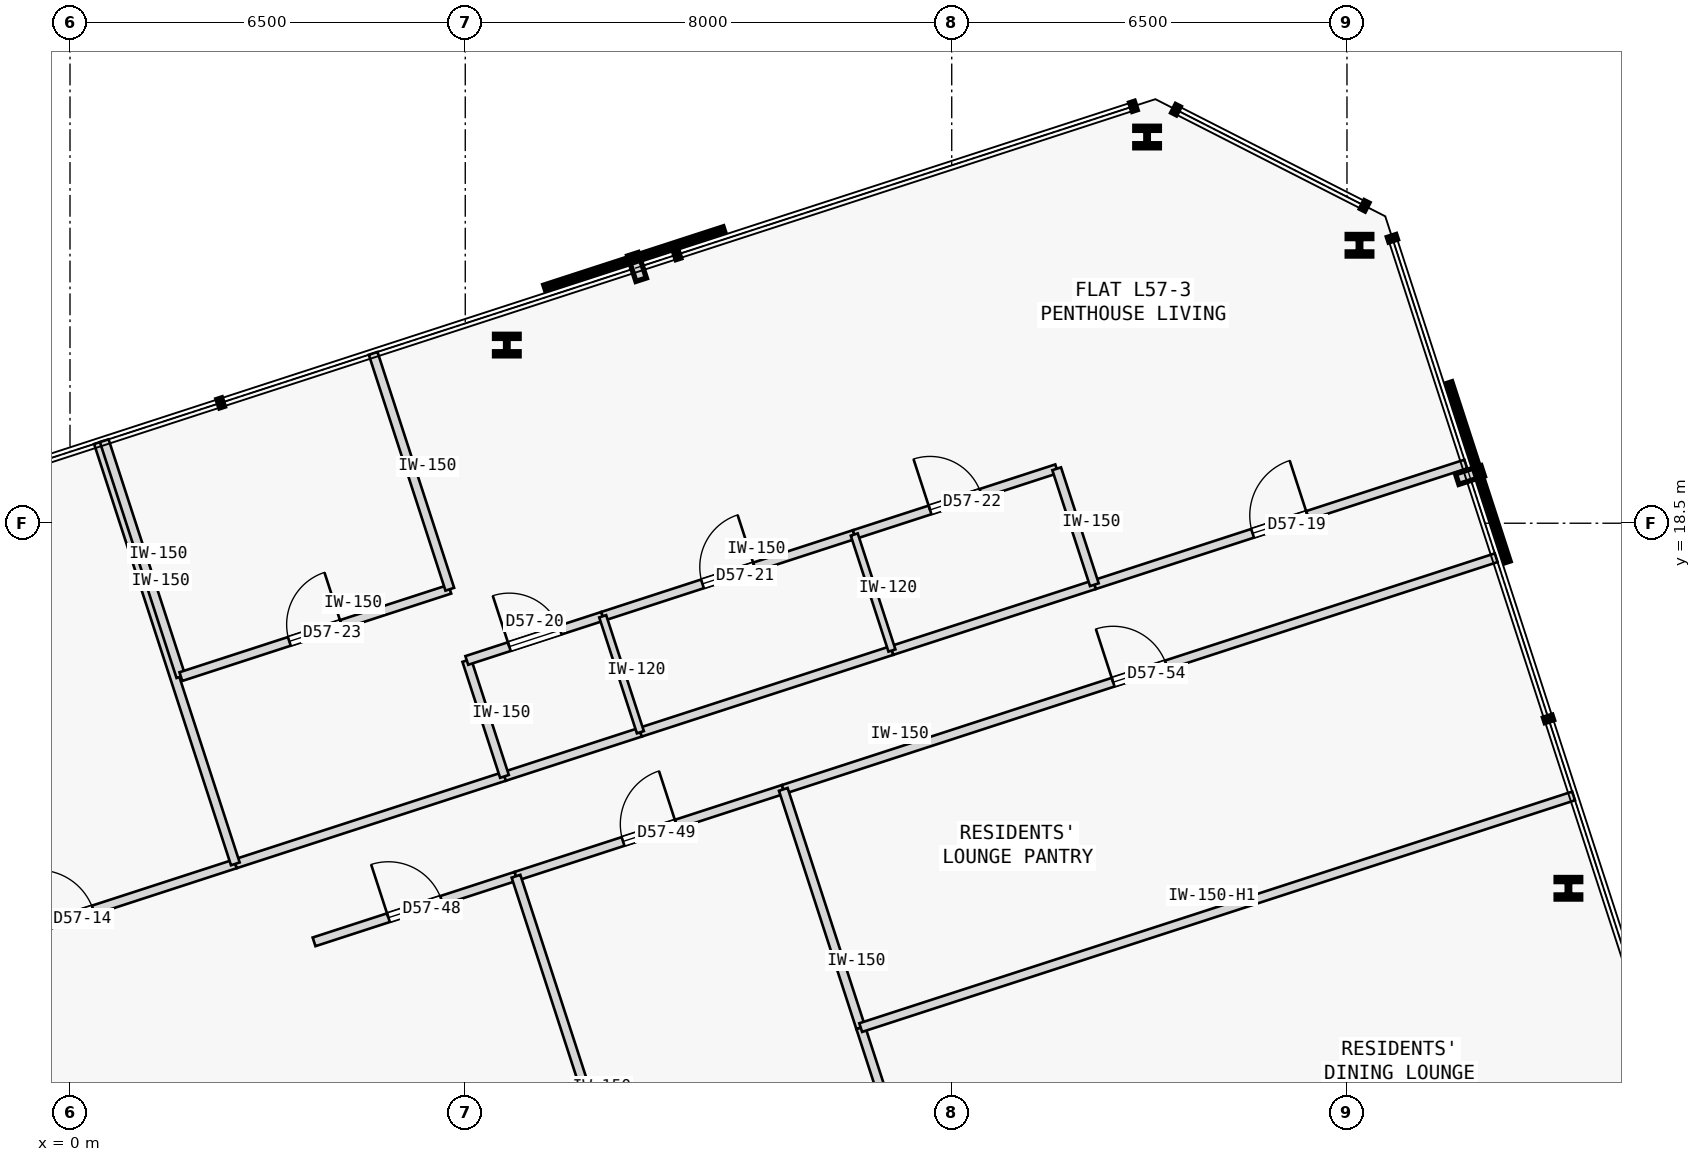
"""IFC4 building model, lengths in metres.
Left out: names, types, materials, properties, quantities, classifications, styles, units other than length and angle.
Written with IfcOpenShell. Run it as: python <this file> out.ifc"""

import sys

from ifc_helpers import new_model, si_unit, direction, frame, frame_2d, origin, origin_2d, place, context, subcontext, project, spatial, rectangle, i_section, extrude, element, fill, save


model = new_model("IFC4")
c1 = context("Model", 3, precision=1e-05, world=origin(), true_north=direction((0.0, 1.0)))
c2 = subcontext(c1, "Body", "Model", "MODEL_VIEW")
j1 = project(units=[si_unit("LENGTHUNIT", "METRE"), si_unit("PLANEANGLEUNIT", "RADIAN")], contexts=[c1])
p1 = place(None, origin())
s1 = spatial("IfcSite", under=j1, at=p1, CompositionType="ELEMENT")
p2 = place(p1, origin())
s2 = spatial("IfcBuilding", under=s1, at=p2, CompositionType="ELEMENT")
p3 = place(p2, frame((0.0, 0.0, 217.6)))
s3 = spatial("IfcBuildingStorey", under=s2, at=p3, CompositionType="ELEMENT", Elevation=217.6)
for number, where, z_axis, x_axis in (
    (1, (24.642, 12.497, 0.0), (0.0, 0.0, 1.0), (1.0, 0.0, 0.0)),
    (2, (21.206, 23.071, 0.0), (0.0, 0.0, 1.0), (1.0, 0.0, 0.0)),
    (3, (17.713, 24.851, 0.0), (0.0, 0.0, 1.0), (1.0, 0.0, 0.0)),
    (4, (7.184, 21.43, 0.0), (0.0, 0.0, 1.0), (1.0, 0.0, 0.0)),
):
    element("IfcColumn", number, at=place(p3, frame(where, z_axis=z_axis, x_axis=x_axis)), inside=s3, PredefinedType="COLUMN", context=c2, shape_type="SweptSolid", body=[
        extrude(i_section(OverallWidth=0.405, OverallDepth=0.355, WebThickness=0.042, FlangeThickness=0.068, FilletRadius=0.015, at=origin_2d()), origin(), (0.0, 0.0, 1.0), 3.35),
    ])
p4 = place(p3, frame((-2.856, 11.087, 0.0), z_axis=(0.0, 0.0, 1.0), x_axis=(0.95106314138, 0.308996603718, 0.0)))
e5 = element("IfcWall", 5, at=p4, inside=s3, PredefinedType="PARTITIONING", context=c2, shape_type="SweptSolid", body=[
    extrude(rectangle(XDim=5.862, YDim=0.15, at=frame_2d((2.931, 0.0))), origin(), (0.0, 0.0, 1.0), 3.125),
])
p5 = place(p4, frame((2.456, 0.0, 0.0)))
e6 = element("IfcOpeningElement", 6, at=p5, cuts=e5, PredefinedType="OPENING", context=c2, shape_type="SweptSolid", body=[
    extrude(rectangle(XDim=0.95, YDim=2.15, at=frame_2d((0.475, 1.075))), frame((0.0, 0.085, 0.0), z_axis=(0.0, -1.0, 0.0), x_axis=(1.0, 0.0, 0.0)), (0.0, 0.0, 1.0), 0.17),
])
p6 = place(p3, frame((2.719, 12.898, 0.0), z_axis=(0.0, 0.0, 1.0), x_axis=(0.951053341802, 0.309026764289, 0.0)))
e7 = element("IfcWall", 7, at=p6, inside=s3, PredefinedType="PARTITIONING", context=c2, shape_type="SweptSolid", body=[
    extrude(rectangle(XDim=4.654, YDim=0.15, at=frame_2d((2.327, 0.0))), origin(), (0.0, 0.0, 1.0), 3.125),
])
p7 = place(p3, frame((16.846, 17.489, 0.0), z_axis=(0.0, 0.0, 1.0), x_axis=(0.951062281754, 0.308999249554, 0.0)))
e8 = element("IfcWall", 8, at=p7, inside=s3, PredefinedType="PARTITIONING", context=c2, shape_type="SweptSolid", body=[
    extrude(rectangle(XDim=6.422, YDim=0.15, at=frame_2d((3.211, 0.0))), origin(), (0.0, 0.0, 1.0), 3.125),
])
p8 = place(p7, frame((2.736, 0.0, 0.0)))
e9 = element("IfcOpeningElement", 9, at=p8, cuts=e8, PredefinedType="OPENING", context=c2, shape_type="SweptSolid", body=[
    extrude(rectangle(XDim=0.95, YDim=2.15, at=frame_2d((0.475, 1.075))), frame((0.0, 0.085, 0.0), z_axis=(0.0, -1.0, 0.0), x_axis=(1.0, 0.0, 0.0)), (0.0, 0.0, 1.0), 0.17),
])
p9 = place(p3, frame((7.145, 14.337, 0.0), z_axis=(0.0, 0.0, 1.0), x_axis=(0.951045519245, 0.309050837767, 0.0)))
e10 = element("IfcWall", 10, at=p9, inside=s3, PredefinedType="PARTITIONING", context=c2, shape_type="SweptSolid", body=[
    extrude(rectangle(XDim=2.35, YDim=0.15, at=frame_2d((1.175, 0.0))), origin(), (0.0, 0.0, 1.0), 3.125),
])
p10 = place(p3, frame((9.38, 15.063, 0.0), z_axis=(0.0, 0.0, 1.0), x_axis=(0.951069122051, 0.308978195154, 0.0)))
e11 = element("IfcWall", 11, at=p10, inside=s3, PredefinedType="PARTITIONING", context=c2, shape_type="SweptSolid", body=[
    extrude(rectangle(XDim=4.35, YDim=0.15, at=frame_2d((2.175, 0.0))), origin(), (0.0, 0.0, 1.0), 3.125),
])
p11 = place(p3, frame((13.517, 16.407, 0.0), z_axis=(0.0, 0.0, 1.0), x_axis=(0.951041757107, 0.309062414796, 0.0)))
e12 = element("IfcWall", 12, at=p11, inside=s3, PredefinedType="PARTITIONING", context=c2, shape_type="SweptSolid", body=[
    extrude(rectangle(XDim=3.5, YDim=0.15, at=frame_2d((1.75, 0.0))), origin(), (0.0, 0.0, 1.0), 3.125),
])
p12 = place(p3, frame((4.013, 11.616, 0.0), z_axis=(0.0, 0.0, 1.0), x_axis=(0.951054104561, 0.309024416831, 0.0)))
e13 = element("IfcWall", 13, at=p12, inside=s3, PredefinedType="PARTITIONING", context=c2, shape_type="SweptSolid", body=[
    extrude(rectangle(XDim=3.492, YDim=0.15, at=frame_2d((1.746, 0.0))), origin(), (0.0, 0.0, 1.0), 3.125),
])
p13 = place(p12, frame((1.286, 0.0, 0.0)))
e14 = element("IfcOpeningElement", 14, at=p13, cuts=e13, PredefinedType="OPENING", context=c2, shape_type="SweptSolid", body=[
    extrude(rectangle(XDim=0.92, YDim=2.15, at=frame_2d((0.46, 1.075))), frame((0.0, 0.085, 0.0), z_axis=(0.0, -1.0, 0.0), x_axis=(1.0, 0.0, 0.0)), (0.0, 0.0, 1.0), 0.17),
])
p14 = place(p3, frame((7.334, 12.695, 0.0), z_axis=(0.0, 0.0, 1.0), x_axis=(0.951043772533, 0.30905621289, 0.0)))
e15 = element("IfcWall", 15, at=p14, inside=s3, PredefinedType="PARTITIONING", context=c2, shape_type="SweptSolid", body=[
    extrude(rectangle(XDim=4.622, YDim=0.15, at=frame_2d((2.311, 0.0))), origin(), (0.0, 0.0, 1.0), 3.125),
])
p15 = place(p14, frame((1.851, 0.0, 0.0)))
e16 = element("IfcOpeningElement", 16, at=p15, cuts=e15, PredefinedType="OPENING", context=c2, shape_type="SweptSolid", body=[
    extrude(rectangle(XDim=0.92, YDim=2.15, at=frame_2d((0.46, 1.075))), frame((0.0, 0.085, 0.0), z_axis=(0.0, -1.0, 0.0), x_axis=(1.0, 0.0, 0.0)), (0.0, 0.0, 1.0), 0.17),
])
p16 = place(p3, frame((11.73, 14.123, 0.0), z_axis=(0.0, 0.0, 1.0), x_axis=(0.951060263663, 0.309005460926, 0.0)))
e17 = element("IfcWall", 17, at=p16, inside=s3, PredefinedType="PARTITIONING", context=c2, shape_type="SweptSolid", body=[
    extrude(rectangle(XDim=12.327, YDim=0.15, at=frame_2d((6.164, 0.0))), origin(), (0.0, 0.0, 1.0), 3.125),
])
p17 = place(p16, frame((5.704, 0.0, 0.0)))
e18 = element("IfcOpeningElement", 18, at=p17, cuts=e17, PredefinedType="OPENING", context=c2, shape_type="SweptSolid", body=[
    extrude(rectangle(XDim=0.92, YDim=2.15, at=frame_2d((0.46, 1.075))), frame((0.0, 0.085, 0.0), z_axis=(0.0, -1.0, 0.0), x_axis=(1.0, 0.0, 0.0)), (0.0, 0.0, 1.0), 0.17),
])
p18 = place(p3, frame((2.719, 12.898, 0.0), z_axis=(0.0, 0.0, 1.0), x_axis=(-0.308998913866, 0.951062390819, 0.0)))
e19 = element("IfcWall", 19, at=p18, inside=s3, PredefinedType="PARTITIONING", context=c2, shape_type="SweptSolid", body=[
    extrude(rectangle(XDim=7.284, YDim=0.15, at=frame_2d((3.642, 0.0))), origin(), (0.0, 0.0, 1.0), 3.125),
])
p19 = place(p3, frame((7.145, 14.337, 0.0), z_axis=(0.0, 0.0, 1.0), x_axis=(-0.308948390121, 0.951078804433, 0.0)))
e20 = element("IfcWall", 20, at=p19, inside=s3, PredefinedType="PARTITIONING", context=c2, shape_type="SweptSolid", body=[
    extrude(rectangle(XDim=2.005, YDim=0.15, at=frame_2d((1.002, 0.0))), origin(), (0.0, 0.0, 1.0), 3.125),
])
p20 = place(p3, frame((6.525, 16.243, 0.0), z_axis=(0.0, 0.0, 1.0), x_axis=(0.951035595692, 0.309081373955, 0.0)))
e21 = element("IfcWall", 21, at=p20, inside=s3, PredefinedType="PARTITIONING", context=c2, shape_type="SweptSolid", body=[
    extrude(rectangle(XDim=2.35, YDim=0.15, at=frame_2d((1.175, 0.0))), origin(), (0.0, 0.0, 1.0), 3.125),
])
p21 = place(p20, frame((0.735, 0.0, 0.0)))
e22 = element("IfcOpeningElement", 22, at=p21, cuts=e21, PredefinedType="OPENING", context=c2, shape_type="SweptSolid", body=[
    extrude(rectangle(XDim=0.88, YDim=2.15, at=frame_2d((0.44, 1.075))), frame((0.0, 0.085, 0.0), z_axis=(0.0, -1.0, 0.0), x_axis=(1.0, 0.0, 0.0)), (0.0, 0.0, 1.0), 0.17),
])
p22 = place(p3, frame((8.76, 16.97, 0.0), z_axis=(0.0, 0.0, 1.0), x_axis=(0.951052627573, 0.309028962374, 0.0)))
e23 = element("IfcWall", 23, at=p22, inside=s3, PredefinedType="PARTITIONING", context=c2, shape_type="SweptSolid", body=[
    extrude(rectangle(XDim=4.35, YDim=0.15, at=frame_2d((2.175, 0.0))), origin(), (0.0, 0.0, 1.0), 3.125),
])
p23 = place(p22, frame((1.725, 0.0, 0.0)))
e24 = element("IfcOpeningElement", 24, at=p23, cuts=e23, PredefinedType="OPENING", context=c2, shape_type="SweptSolid", body=[
    extrude(rectangle(XDim=0.9, YDim=2.15, at=frame_2d((0.45, 1.075))), frame((0.0, 0.085, 0.0), z_axis=(0.0, -1.0, 0.0), x_axis=(1.0, 0.0, 0.0)), (0.0, 0.0, 1.0), 0.17),
])
p24 = place(p3, frame((12.897, 18.314, 0.0), z_axis=(0.0, 0.0, 1.0), x_axis=(0.951062257173, 0.308999325213, 0.0)))
e25 = element("IfcWall", 25, at=p24, inside=s3, PredefinedType="PARTITIONING", context=c2, shape_type="SweptSolid", body=[
    extrude(rectangle(XDim=3.5, YDim=0.15, at=frame_2d((1.75, 0.0))), origin(), (0.0, 0.0, 1.0), 3.125),
])
p25 = place(p24, frame((1.31, 0.0, 0.0)))
e26 = element("IfcOpeningElement", 26, at=p25, cuts=e25, PredefinedType="OPENING", context=c2, shape_type="SweptSolid", body=[
    extrude(rectangle(XDim=0.88, YDim=2.15, at=frame_2d((0.44, 1.075))), frame((0.0, 0.085, 0.0), z_axis=(0.0, -1.0, 0.0), x_axis=(1.0, 0.0, 0.0)), (0.0, 0.0, 1.0), 0.17),
])
p26 = place(p3, frame((16.846, 17.489, 0.0), z_axis=(0.0, 0.0, 1.0), x_axis=(-0.309058537449, 0.951043017129, 0.0)))
e27 = element("IfcWall", 27, at=p26, inside=s3, PredefinedType="PARTITIONING", context=c2, shape_type="SweptSolid", body=[
    extrude(rectangle(XDim=2.005, YDim=0.15, at=frame_2d((1.002, 0.0))), origin(), (0.0, 0.0, 1.0), 3.125),
])
p27 = place(p3, frame((1.823, 15.978, 0.0), z_axis=(0.0, 0.0, 1.0), x_axis=(-0.309018403393, 0.951056058476, 0.0)))
e28 = element("IfcWall", 28, at=p27, inside=s3, PredefinedType="PARTITIONING", context=c2, shape_type="SweptSolid", body=[
    extrude(rectangle(XDim=4.079, YDim=0.15, at=frame_2d((2.04, 0.0))), origin(), (0.0, 0.0, 1.0), 3.125),
])
p28 = place(p3, frame((1.823, 15.978, 0.0), z_axis=(0.0, 0.0, 1.0), x_axis=(0.951050272606, 0.309036209813, 0.0)))
e29 = element("IfcWall", 29, at=p28, inside=s3, PredefinedType="PARTITIONING", context=c2, shape_type="SweptSolid", body=[
    extrude(rectangle(XDim=4.65, YDim=0.15, at=frame_2d((2.325, 0.0))), origin(), (0.0, 0.0, 1.0), 3.125),
])
p29 = place(p28, frame((1.875, 0.0, 0.0)))
e30 = element("IfcOpeningElement", 30, at=p29, cuts=e29, PredefinedType="OPENING", context=c2, shape_type="SweptSolid", body=[
    extrude(rectangle(XDim=0.9, YDim=2.15, at=frame_2d((0.45, 1.075))), frame((0.0, 0.085, 0.0), z_axis=(0.0, -1.0, 0.0), x_axis=(1.0, 0.0, 0.0)), (0.0, 0.0, 1.0), 0.17),
])
p30 = place(p3, frame((6.246, 17.415, 0.0), z_axis=(0.0, 0.0, 1.0), x_axis=(-0.308981853652, 0.95106793349, 0.0)))
e31 = element("IfcWall", 31, at=p30, inside=s3, PredefinedType="PARTITIONING", context=c2, shape_type="SweptSolid", body=[
    extrude(rectangle(XDim=4.079, YDim=0.15, at=frame_2d((2.039, 0.0))), origin(), (0.0, 0.0, 1.0), 3.125),
])
p31 = place(p3, frame((9.38, 15.063, 0.0), z_axis=(0.0, 0.0, 1.0), x_axis=(-0.309058537449, 0.951043017129, 0.0)))
e32 = element("IfcWall", 32, at=p31, inside=s3, PredefinedType="PARTITIONING", context=c2, shape_type="SweptSolid", body=[
    extrude(rectangle(XDim=2.005, YDim=0.12, at=frame_2d((1.002, 0.0))), origin(), (0.0, 0.0, 1.0), 3.125),
])
p32 = place(p3, frame((13.517, 16.407, 0.0), z_axis=(0.0, 0.0, 1.0), x_axis=(-0.309022749039, 0.951054646472, 0.0)))
e33 = element("IfcWall", 33, at=p32, inside=s3, PredefinedType="PARTITIONING", context=c2, shape_type="SweptSolid", body=[
    extrude(rectangle(XDim=2.005, YDim=0.12, at=frame_2d((1.002, 0.0))), origin(), (0.0, 0.0, 1.0), 3.125),
])
p33 = place(p3, frame((9.64, 5.6, 0.0), z_axis=(0.0, 0.0, 1.0), x_axis=(-0.309012069377, 0.95105811651, 0.0)))
e34 = element("IfcWall", 34, at=p33, inside=s3, PredefinedType="PARTITIONING", context=c2, shape_type="SweptSolid", body=[
    extrude(rectangle(XDim=7.46, YDim=0.15, at=frame_2d((3.73, 0.0))), origin(), (0.0, 0.0, 1.0), 3.125),
])
p34 = place(p3, frame((14.5, 5.6, 0.0), z_axis=(0.0, 0.0, 1.0), x_axis=(-0.308974360462, 0.951070367837, 0.0)))
e35 = element("IfcWall", 35, at=p34, inside=s3, PredefinedType="PARTITIONING", context=c2, shape_type="SweptSolid", body=[
    extrude(rectangle(XDim=4.843, YDim=0.15, at=frame_2d((2.421, 0.0))), origin(), (0.0, 0.0, 1.0), 3.125),
])
p35 = place(p3, frame((13.003, 10.206, 0.0), z_axis=(0.0, 0.0, 1.0), x_axis=(-0.309035144366, 0.951050618814, 0.0)))
e36 = element("IfcWall", 36, at=p35, inside=s3, PredefinedType="PARTITIONING", context=c2, shape_type="SweptSolid", body=[
    extrude(rectangle(XDim=4.119, YDim=0.15, at=frame_2d((2.06, 0.0))), origin(), (0.0, 0.0, 1.0), 3.125),
])
p36 = place(p3, frame((13.003, 10.206, 0.0), z_axis=(0.0, 0.0, 1.0), x_axis=(0.951060263663, 0.309005460926, 0.0)))
e37 = element("IfcWall", 37, at=p36, inside=s3, PredefinedType="PARTITIONING", context=c2, shape_type="SweptSolid", body=[
    extrude(rectangle(XDim=12.327, YDim=0.15, at=frame_2d((6.164, 0.0))), origin(), (0.0, 0.0, 1.0), 2.675),
])
p37 = place(p5, origin())
e38 = element("IfcDoor", 38, at=p37, inside=s3, OperationType="SINGLE_SWING_LEFT", PredefinedType="DOOR", context=c2, shape_type="SweptSolid", body=[
    extrude(rectangle(XDim=0.95, YDim=2.15, at=frame_2d((0.475, 1.075))), frame((0.0, 0.025, 0.0), z_axis=(0.0, -1.0, 0.0), x_axis=(1.0, 0.0, 0.0)), (0.0, 0.0, 1.0), 0.05),
])
fill(e6, e38)
p38 = place(p8, origin())
e39 = element("IfcDoor", 39, at=p38, inside=s3, OperationType="SINGLE_SWING_RIGHT", PredefinedType="DOOR", context=c2, shape_type="SweptSolid", body=[
    extrude(rectangle(XDim=0.95, YDim=2.15, at=frame_2d((0.475, 1.075))), frame((0.0, 0.025, 0.0), z_axis=(0.0, -1.0, 0.0), x_axis=(1.0, 0.0, 0.0)), (0.0, 0.0, 1.0), 0.05),
])
fill(e9, e39)
p39 = place(p21, origin())
e40 = element("IfcDoor", 40, at=p39, inside=s3, OperationType="SINGLE_SWING_LEFT", PredefinedType="DOOR", context=c2, shape_type="SweptSolid", body=[
    extrude(rectangle(XDim=0.88, YDim=2.15, at=frame_2d((0.44, 1.075))), frame((0.0, 0.025, 0.0), z_axis=(0.0, -1.0, 0.0), x_axis=(1.0, 0.0, 0.0)), (0.0, 0.0, 1.0), 0.05),
])
fill(e22, e40)
p40 = place(p23, origin())
e41 = element("IfcDoor", 41, at=p40, inside=s3, OperationType="SINGLE_SWING_RIGHT", PredefinedType="DOOR", context=c2, shape_type="SweptSolid", body=[
    extrude(rectangle(XDim=0.9, YDim=2.15, at=frame_2d((0.45, 1.075))), frame((0.0, 0.025, 0.0), z_axis=(0.0, -1.0, 0.0), x_axis=(1.0, 0.0, 0.0)), (0.0, 0.0, 1.0), 0.05),
])
fill(e24, e41)
p41 = place(p25, origin())
e42 = element("IfcDoor", 42, at=p41, inside=s3, OperationType="SINGLE_SWING_LEFT", PredefinedType="DOOR", context=c2, shape_type="SweptSolid", body=[
    extrude(rectangle(XDim=0.88, YDim=2.15, at=frame_2d((0.44, 1.075))), frame((0.0, 0.025, 0.0), z_axis=(0.0, -1.0, 0.0), x_axis=(1.0, 0.0, 0.0)), (0.0, 0.0, 1.0), 0.05),
])
fill(e26, e42)
p42 = place(p29, origin())
e43 = element("IfcDoor", 43, at=p42, inside=s3, OperationType="SINGLE_SWING_RIGHT", PredefinedType="DOOR", context=c2, shape_type="SweptSolid", body=[
    extrude(rectangle(XDim=0.9, YDim=2.15, at=frame_2d((0.45, 1.075))), frame((0.0, 0.025, 0.0), z_axis=(0.0, -1.0, 0.0), x_axis=(1.0, 0.0, 0.0)), (0.0, 0.0, 1.0), 0.05),
])
fill(e30, e43)
p43 = place(p13, origin())
e44 = element("IfcDoor", 44, at=p43, inside=s3, OperationType="SINGLE_SWING_LEFT", PredefinedType="DOOR", context=c2, shape_type="SweptSolid", body=[
    extrude(rectangle(XDim=0.92, YDim=2.15, at=frame_2d((0.46, 1.075))), frame((0.0, 0.025, 0.0), z_axis=(0.0, -1.0, 0.0), x_axis=(1.0, 0.0, 0.0)), (0.0, 0.0, 1.0), 0.05),
])
fill(e14, e44)
p44 = place(p15, origin())
e45 = element("IfcDoor", 45, at=p44, inside=s3, OperationType="SINGLE_SWING_RIGHT", PredefinedType="DOOR", context=c2, shape_type="SweptSolid", body=[
    extrude(rectangle(XDim=0.92, YDim=2.15, at=frame_2d((0.46, 1.075))), frame((0.0, 0.025, 0.0), z_axis=(0.0, -1.0, 0.0), x_axis=(1.0, 0.0, 0.0)), (0.0, 0.0, 1.0), 0.05),
])
fill(e16, e45)
p45 = place(p17, origin())
e46 = element("IfcDoor", 46, at=p45, inside=s3, OperationType="SINGLE_SWING_LEFT", PredefinedType="DOOR", context=c2, shape_type="SweptSolid", body=[
    extrude(rectangle(XDim=0.92, YDim=2.15, at=frame_2d((0.46, 1.075))), frame((0.0, 0.025, 0.0), z_axis=(0.0, -1.0, 0.0), x_axis=(1.0, 0.0, 0.0)), (0.0, 0.0, 1.0), 0.05),
])
fill(e18, e46)
save(model, sys.argv[1])
